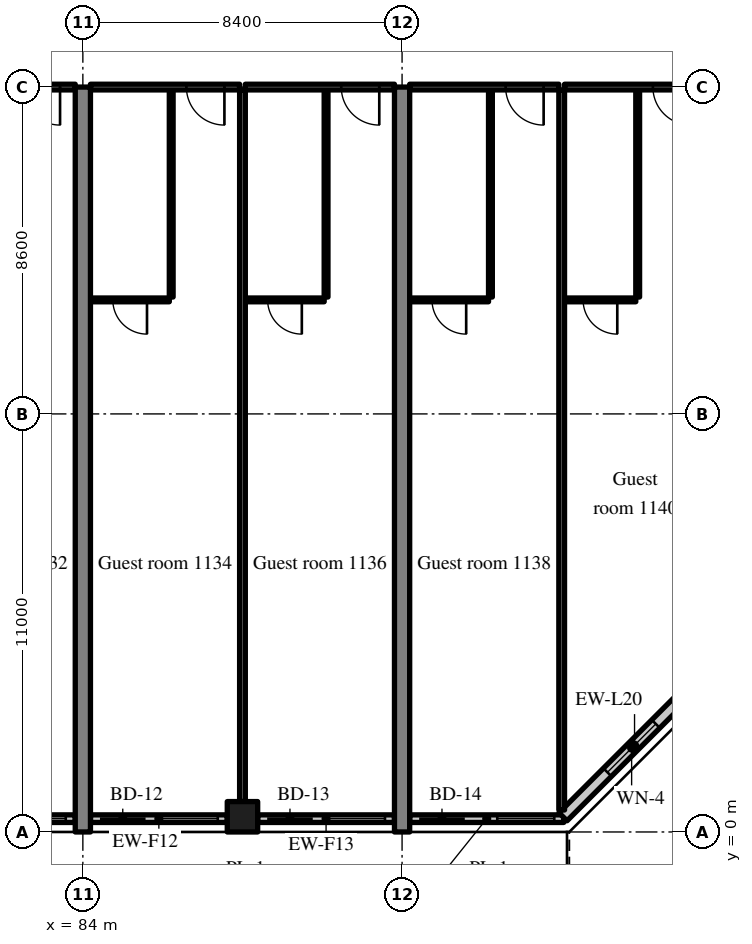
"""IFC4 building model, lengths in metres.
Left out: names, types, materials, properties, quantities, classifications, styles, units other than length and angle.
Written with IfcOpenShell. Run it as: python <this file> out.ifc"""

import sys

from ifc_helpers import new_model, si_unit, direction, frame, frame_2d, origin, origin_2d, place, context, subcontext, project, spatial, rectangle, extrude, source, transform, mapped, element, fill, save


model = new_model("IFC4")
c1 = context("Model", 3, precision=1e-05, world=origin(), true_north=direction((0.0, 1.0)))
c2 = subcontext(c1, "Body", "Model", "MODEL_VIEW")
j1 = project(units=[si_unit("LENGTHUNIT", "METRE"), si_unit("PLANEANGLEUNIT", "RADIAN")], contexts=[c1])
p1 = place(None, origin())
s1 = spatial("IfcSite", under=j1, at=p1, CompositionType="ELEMENT")
p2 = place(p1, origin())
s2 = spatial("IfcBuilding", under=s1, at=p2, CompositionType="ELEMENT")
p3 = place(p2, frame((0.0, 0.0, 50.6)))
s3 = spatial("IfcBuildingStorey", under=s2, at=p3, CompositionType="ELEMENT", Elevation=50.6)
m1 = source(origin(), c2, "Body", "SweptSolid", [
    extrude(rectangle(XDim=19.6, YDim=0.4, at=frame_2d((9.8, 0.0))), origin(), (0.0, 0.0, 1.0), 3.52),
])
for number, where, z_axis, x_axis in (
    (1, (84.0, 0.0, 0.0), (0.0, 0.0, 1.0), (0.0, 1.0, 0.0)),
    (2, (92.4, 0.0, 0.0), (0.0, 0.0, 1.0), (0.0, 1.0, 0.0)),
):
    element("IfcWall", number, at=place(p3, frame(where, z_axis=z_axis, x_axis=x_axis)), inside=s3, PredefinedType="SHEAR", context=c2, shape_type="MappedRepresentation", body=[
        mapped(m1, transform((0.0, 0.0, 0.0), scale=1.0)),
    ])
m2 = source(origin(), c2, "Body", "SweptSolid", [
    extrude(rectangle(XDim=0.8, YDim=0.8, at=origin_2d()), origin(), (0.0, 0.0, 1.0), 3.52),
])
p4 = place(p3, frame((88.2, 0.4, 0.0), z_axis=(0.0, 0.0, 1.0), x_axis=(1.0, 0.0, 0.0)))
e3 = element("IfcColumn", 3, at=p4, inside=s3, PredefinedType="COLUMN", context=c2, shape_type="MappedRepresentation", body=[
    mapped(m2, transform((0.0, 0.0, 0.0), scale=1.0)),
])
m3 = source(origin(), c2, "Body", "SweptSolid", [
    extrude(rectangle(XDim=3.6, YDim=0.2, at=frame_2d((1.8, 0.0))), origin(), (0.0, 0.0, 1.0), 2.82),
])
p5 = place(p3, frame((80.2, 0.35, 0.0), z_axis=(0.0, 0.0, 1.0), x_axis=(1.0, 0.0, 0.0)))
e4 = element("IfcWall", 4, at=p5, inside=s3, PredefinedType="SOLIDWALL", context=c2, shape_type="MappedRepresentation", body=[
    mapped(m3, transform((0.0, 0.0, 0.0), scale=1.0)),
])
m4 = source(origin(), c2, "Body", "SweptSolid", [
    extrude(rectangle(XDim=1.2, YDim=2.4, at=frame_2d((0.6, 1.2))), frame((0.0, 0.11, 0.0), z_axis=(0.0, -1.0, 0.0), x_axis=(1.0, 0.0, 0.0)), (0.0, 0.0, 1.0), 0.22),
])
p6 = place(p5, frame((0.25, 0.0, 0.0)))
e5 = element("IfcOpeningElement", 5, at=p6, cuts=e4, PredefinedType="OPENING", context=c2, shape_type="MappedRepresentation", body=[
    mapped(m4, transform((0.0, 0.0, 0.0), scale=1.0)),
])
m5 = source(origin(), c2, "Body", "SweptSolid", [
    extrude(rectangle(XDim=1.5, YDim=1.5, at=frame_2d((0.75, 0.75))), frame((0.0, 0.11, 0.0), z_axis=(0.0, -1.0, 0.0), x_axis=(1.0, 0.0, 0.0)), (0.0, 0.0, 1.0), 0.22),
])
p7 = place(p5, frame((1.85, 0.0, 0.9)))
e6 = element("IfcOpeningElement", 6, at=p7, cuts=e4, PredefinedType="OPENING", context=c2, shape_type="MappedRepresentation", body=[
    mapped(m5, transform((0.0, 0.0, 0.0), scale=1.0)),
])
p8 = place(p3, frame((84.2, 0.35, 0.0), z_axis=(0.0, 0.0, 1.0), x_axis=(1.0, 0.0, 0.0)))
e7 = element("IfcWall", 7, at=p8, inside=s3, PredefinedType="SOLIDWALL", context=c2, shape_type="MappedRepresentation", body=[
    mapped(m3, transform((0.0, 0.0, 0.0), scale=1.0)),
])
p9 = place(p8, frame((0.25, 0.0, 0.0)))
e8 = element("IfcOpeningElement", 8, at=p9, cuts=e7, PredefinedType="OPENING", context=c2, shape_type="MappedRepresentation", body=[
    mapped(m4, transform((0.0, 0.0, 0.0), scale=1.0)),
])
p10 = place(p8, frame((1.85, 0.0, 0.9)))
e9 = element("IfcOpeningElement", 9, at=p10, cuts=e7, PredefinedType="OPENING", context=c2, shape_type="MappedRepresentation", body=[
    mapped(m5, transform((0.0, 0.0, 0.0), scale=1.0)),
])
m6 = source(origin(), c2, "Body", "SweptSolid", [
    extrude(rectangle(XDim=3.6, YDim=0.2, at=frame_2d((1.8, 0.0))), origin(), (0.0, 0.0, 1.0), 2.82),
])
p11 = place(p3, frame((88.6, 0.35, 0.0), z_axis=(0.0, 0.0, 1.0), x_axis=(1.0, 0.0, 0.0)))
e10 = element("IfcWall", 10, at=p11, inside=s3, PredefinedType="SOLIDWALL", context=c2, shape_type="MappedRepresentation", body=[
    mapped(m6, transform((0.0, 0.0, 0.0), scale=1.0)),
])
p12 = place(p11, frame((0.25, 0.0, 0.0)))
e11 = element("IfcOpeningElement", 11, at=p12, cuts=e10, PredefinedType="OPENING", context=c2, shape_type="MappedRepresentation", body=[
    mapped(m4, transform((0.0, 0.0, 0.0), scale=1.0)),
])
p13 = place(p11, frame((1.85, 0.0, 0.9)))
e12 = element("IfcOpeningElement", 12, at=p13, cuts=e10, PredefinedType="OPENING", context=c2, shape_type="MappedRepresentation", body=[
    mapped(m5, transform((0.0, 0.0, 0.0), scale=1.0)),
])
m7 = source(origin(), c2, "Body", "SweptSolid", [
    extrude(rectangle(XDim=4.055, YDim=0.2, at=frame_2d((2.027, 0.0))), origin(), (0.0, 0.0, 1.0), 2.82),
])
p14 = place(p3, frame((92.6, 0.35, 0.0), z_axis=(0.0, 0.0, 1.0), x_axis=(1.0, 0.0, 0.0)))
e13 = element("IfcWall", 13, at=p14, inside=s3, PredefinedType="SOLIDWALL", context=c2, shape_type="MappedRepresentation", body=[
    mapped(m7, transform((0.0, 0.0, 0.0), scale=1.0)),
])
p15 = place(p14, frame((0.25, 0.0, 0.0)))
e14 = element("IfcOpeningElement", 14, at=p15, cuts=e13, PredefinedType="OPENING", context=c2, shape_type="MappedRepresentation", body=[
    mapped(m4, transform((0.0, 0.0, 0.0), scale=1.0)),
])
p16 = place(p14, frame((2.305, 0.0, 0.9)))
e15 = element("IfcOpeningElement", 15, at=p16, cuts=e13, PredefinedType="OPENING", context=c2, shape_type="MappedRepresentation", body=[
    mapped(m5, transform((0.0, 0.0, 0.0), scale=1.0)),
])
m8 = source(origin(), c2, "Body", "SweptSolid", [
    extrude(rectangle(XDim=5.326, YDim=0.3, at=frame_2d((2.663, 0.0))), origin(), (0.0, 0.0, 1.0), 3.52),
])
p17 = place(p3, frame((96.634, 0.4, 0.0), z_axis=(0.0, 0.0, 1.0), x_axis=(0.707083859269, 0.707129702361, 0.0)))
e16 = element("IfcWall", 16, at=p17, inside=s3, PredefinedType="SOLIDWALL", context=c2, shape_type="MappedRepresentation", body=[
    mapped(m8, transform((0.0, 0.0, 0.0), scale=1.0)),
])
m9 = source(origin(), c2, "Body", "SweptSolid", [
    extrude(rectangle(XDim=1.8, YDim=1.5, at=frame_2d((0.9, 0.75))), frame((0.0, 0.16, 0.0), z_axis=(0.0, -1.0, 0.0), x_axis=(1.0, 0.0, 0.0)), (0.0, 0.0, 1.0), 0.32),
])
p18 = place(p17, frame((1.654, 0.0, 0.9)))
e17 = element("IfcOpeningElement", 17, at=p18, cuts=e16, PredefinedType="OPENING", context=c2, shape_type="MappedRepresentation", body=[
    mapped(m9, transform((0.0, 0.0, 0.0), scale=1.0)),
])
m10 = source(origin(), c2, "Body", "SweptSolid", [
    extrude(rectangle(XDim=3.925, YDim=0.15, at=frame_2d((1.962, 0.0))), origin(), (0.0, 0.0, 1.0), 2.82),
])
p19 = place(p3, frame((79.875, 19.6, 0.0), z_axis=(0.0, 0.0, 1.0), x_axis=(1.0, 0.0, 0.0)))
e18 = element("IfcWall", 18, at=p19, inside=s3, PredefinedType="PARTITIONING", context=c2, shape_type="MappedRepresentation", body=[
    mapped(m10, transform((0.0, 0.0, 0.0), scale=1.0)),
])
m11 = source(origin(), c2, "Body", "SweptSolid", [
    extrude(rectangle(XDim=1.0, YDim=2.1, at=frame_2d((0.5, 1.05))), frame((0.0, 0.085, 0.0), z_axis=(0.0, -1.0, 0.0), x_axis=(1.0, 0.0, 0.0)), (0.0, 0.0, 1.0), 0.17),
])
p20 = place(p19, frame((2.525, 0.0, 0.0)))
e19 = element("IfcOpeningElement", 19, at=p20, cuts=e18, PredefinedType="OPENING", context=c2, shape_type="MappedRepresentation", body=[
    mapped(m11, transform((0.0, 0.0, 0.0), scale=1.0)),
])
m12 = source(origin(), c2, "Body", "SweptSolid", [
    extrude(rectangle(XDim=5.45, YDim=0.1, at=frame_2d((2.725, 0.0))), origin(), (0.0, 0.0, 1.0), 3.52),
])
p21 = place(p3, frame((86.325, 14.075, 0.0), z_axis=(0.0, 0.0, 1.0), x_axis=(0.0, 1.0, 0.0)))
e20 = element("IfcWall", 20, at=p21, inside=s3, PredefinedType="PARTITIONING", context=c2, shape_type="MappedRepresentation", body=[
    mapped(m12, transform((0.0, 0.0, 0.0), scale=1.0)),
])
m13 = source(origin(), c2, "Body", "SweptSolid", [
    extrude(rectangle(XDim=2.075, YDim=0.1, at=frame_2d((1.038, 0.0))), origin(), (0.0, 0.0, 1.0), 3.52),
])
p22 = place(p3, frame((84.2, 14.0, 0.0), z_axis=(0.0, 0.0, 1.0), x_axis=(1.0, 0.0, 0.0)))
e21 = element("IfcWall", 21, at=p22, inside=s3, PredefinedType="PARTITIONING", context=c2, shape_type="MappedRepresentation", body=[
    mapped(m13, transform((0.0, 0.0, 0.0), scale=1.0)),
])
m14 = source(origin(), c2, "Body", "SweptSolid", [
    extrude(rectangle(XDim=0.9, YDim=2.1, at=frame_2d((0.45, 1.05))), frame((0.0, 0.06, 0.0), z_axis=(0.0, -1.0, 0.0), x_axis=(1.0, 0.0, 0.0)), (0.0, 0.0, 1.0), 0.12),
])
p23 = place(p22, frame((0.588, 0.0, 0.0)))
e22 = element("IfcOpeningElement", 22, at=p23, cuts=e21, PredefinedType="OPENING", context=c2, shape_type="MappedRepresentation", body=[
    mapped(m14, transform((0.0, 0.0, 0.0), scale=1.0)),
])
p24 = place(p3, frame((84.2, 19.6, 0.0), z_axis=(0.0, 0.0, 1.0), x_axis=(1.0, 0.0, 0.0)))
e23 = element("IfcWall", 23, at=p24, inside=s3, PredefinedType="PARTITIONING", context=c2, shape_type="MappedRepresentation", body=[
    mapped(m10, transform((0.0, 0.0, 0.0), scale=1.0)),
])
p25 = place(p24, frame((2.525, 0.0, 0.0)))
e24 = element("IfcOpeningElement", 24, at=p25, cuts=e23, PredefinedType="OPENING", context=c2, shape_type="MappedRepresentation", body=[
    mapped(m11, transform((0.0, 0.0, 0.0), scale=1.0)),
])
p26 = place(p3, frame((90.4, 14.075, 0.0), z_axis=(0.0, 0.0, 1.0), x_axis=(0.0, 1.0, 0.0)))
e25 = element("IfcWall", 25, at=p26, inside=s3, PredefinedType="PARTITIONING", context=c2, shape_type="MappedRepresentation", body=[
    mapped(m12, transform((0.0, 0.0, 0.0), scale=1.0)),
])
m15 = source(origin(), c2, "Body", "SweptSolid", [
    extrude(rectangle(XDim=2.075, YDim=0.1, at=frame_2d((1.038, 0.0))), origin(), (0.0, 0.0, 1.0), 3.52),
])
p27 = place(p3, frame((88.275, 14.0, 0.0), z_axis=(0.0, 0.0, 1.0), x_axis=(1.0, 0.0, 0.0)))
e26 = element("IfcWall", 26, at=p27, inside=s3, PredefinedType="PARTITIONING", context=c2, shape_type="MappedRepresentation", body=[
    mapped(m15, transform((0.0, 0.0, 0.0), scale=1.0)),
])
p28 = place(p27, frame((0.587, 0.0, 0.0)))
e27 = element("IfcOpeningElement", 27, at=p28, cuts=e26, PredefinedType="OPENING", context=c2, shape_type="MappedRepresentation", body=[
    mapped(m14, transform((0.0, 0.0, 0.0), scale=1.0)),
])
p29 = place(p3, frame((88.275, 19.6, 0.0), z_axis=(0.0, 0.0, 1.0), x_axis=(1.0, 0.0, 0.0)))
e28 = element("IfcWall", 28, at=p29, inside=s3, PredefinedType="PARTITIONING", context=c2, shape_type="MappedRepresentation", body=[
    mapped(m10, transform((0.0, 0.0, 0.0), scale=1.0)),
])
p30 = place(p29, frame((2.525, 0.0, 0.0)))
e29 = element("IfcOpeningElement", 29, at=p30, cuts=e28, PredefinedType="OPENING", context=c2, shape_type="MappedRepresentation", body=[
    mapped(m11, transform((0.0, 0.0, 0.0), scale=1.0)),
])
m16 = source(origin(), c2, "Body", "SweptSolid", [
    extrude(rectangle(XDim=18.725, YDim=0.15, at=frame_2d((9.362, 0.0))), origin(), (0.0, 0.0, 1.0), 3.52),
])
p31 = place(p3, frame((88.2, 0.8, 0.0), z_axis=(0.0, 0.0, 1.0), x_axis=(0.0, 1.0, 0.0)))
e30 = element("IfcWall", 30, at=p31, inside=s3, PredefinedType="PARTITIONING", context=c2, shape_type="MappedRepresentation", body=[
    mapped(m16, transform((0.0, 0.0, 0.0), scale=1.0)),
])
p32 = place(p3, frame((94.725, 14.075, 0.0), z_axis=(0.0, 0.0, 1.0), x_axis=(0.0, 1.0, 0.0)))
e31 = element("IfcWall", 31, at=p32, inside=s3, PredefinedType="PARTITIONING", context=c2, shape_type="MappedRepresentation", body=[
    mapped(m12, transform((0.0, 0.0, 0.0), scale=1.0)),
])
p33 = place(p3, frame((92.6, 14.0, 0.0), z_axis=(0.0, 0.0, 1.0), x_axis=(1.0, 0.0, 0.0)))
e32 = element("IfcWall", 32, at=p33, inside=s3, PredefinedType="PARTITIONING", context=c2, shape_type="MappedRepresentation", body=[
    mapped(m13, transform((0.0, 0.0, 0.0), scale=1.0)),
])
p34 = place(p33, frame((0.587, 0.0, 0.0)))
e33 = element("IfcOpeningElement", 33, at=p34, cuts=e32, PredefinedType="OPENING", context=c2, shape_type="MappedRepresentation", body=[
    mapped(m14, transform((0.0, 0.0, 0.0), scale=1.0)),
])
m17 = source(origin(), c2, "Body", "SweptSolid", [
    extrude(rectangle(XDim=3.925, YDim=0.15, at=frame_2d((1.962, 0.0))), origin(), (0.0, 0.0, 1.0), 2.82),
])
p35 = place(p3, frame((92.6, 19.6, 0.0), z_axis=(0.0, 0.0, 1.0), x_axis=(1.0, 0.0, 0.0)))
e34 = element("IfcWall", 34, at=p35, inside=s3, PredefinedType="PARTITIONING", context=c2, shape_type="MappedRepresentation", body=[
    mapped(m17, transform((0.0, 0.0, 0.0), scale=1.0)),
])
p36 = place(p35, frame((2.525, 0.0, 0.0)))
e35 = element("IfcOpeningElement", 35, at=p36, cuts=e34, PredefinedType="OPENING", context=c2, shape_type="MappedRepresentation", body=[
    mapped(m11, transform((0.0, 0.0, 0.0), scale=1.0)),
])
p37 = place(p3, frame((98.6, 14.075, 0.0), z_axis=(0.0, 0.0, 1.0), x_axis=(0.0, 1.0, 0.0)))
e36 = element("IfcWall", 36, at=p37, inside=s3, PredefinedType="PARTITIONING", context=c2, shape_type="MappedRepresentation", body=[
    mapped(m12, transform((0.0, 0.0, 0.0), scale=1.0)),
])
m18 = source(origin(), c2, "Body", "SweptSolid", [
    extrude(rectangle(XDim=1.875, YDim=0.1, at=frame_2d((0.938, 0.0))), origin(), (0.0, 0.0, 1.0), 3.52),
])
p38 = place(p3, frame((96.675, 14.0, 0.0), z_axis=(0.0, 0.0, 1.0), x_axis=(1.0, 0.0, 0.0)))
e37 = element("IfcWall", 37, at=p38, inside=s3, PredefinedType="PARTITIONING", context=c2, shape_type="MappedRepresentation", body=[
    mapped(m18, transform((0.0, 0.0, 0.0), scale=1.0)),
])
p39 = place(p38, frame((0.488, 0.0, 0.0)))
e38 = element("IfcOpeningElement", 38, at=p39, cuts=e37, PredefinedType="OPENING", context=c2, shape_type="MappedRepresentation", body=[
    mapped(m14, transform((0.0, 0.0, 0.0), scale=1.0)),
])
m19 = source(origin(), c2, "Body", "SweptSolid", [
    extrude(rectangle(XDim=3.725, YDim=0.15, at=frame_2d((1.862, 0.0))), origin(), (0.0, 0.0, 1.0), 2.82),
])
p40 = place(p3, frame((96.675, 19.6, 0.0), z_axis=(0.0, 0.0, 1.0), x_axis=(1.0, 0.0, 0.0)))
e39 = element("IfcWall", 39, at=p40, inside=s3, PredefinedType="PARTITIONING", context=c2, shape_type="MappedRepresentation", body=[
    mapped(m19, transform((0.0, 0.0, 0.0), scale=1.0)),
])
p41 = place(p40, frame((2.325, 0.0, 0.0)))
e40 = element("IfcOpeningElement", 40, at=p41, cuts=e39, PredefinedType="OPENING", context=c2, shape_type="MappedRepresentation", body=[
    mapped(m11, transform((0.0, 0.0, 0.0), scale=1.0)),
])
m20 = source(origin(), c2, "Body", "SweptSolid", [
    extrude(rectangle(XDim=18.947, YDim=0.15, at=frame_2d((9.474, 0.0))), origin(), (0.0, 0.0, 1.0), 3.52),
])
p42 = place(p3, frame((96.6, 0.578, 0.0), z_axis=(0.0, 0.0, 1.0), x_axis=(0.0, 1.0, 0.0)))
e41 = element("IfcWall", 41, at=p42, inside=s3, PredefinedType="PARTITIONING", context=c2, shape_type="MappedRepresentation", body=[
    mapped(m20, transform((0.0, 0.0, 0.0), scale=1.0)),
])
m21 = source(origin(), c2, "Body", "SweptSolid", [
    extrude(rectangle(XDim=1.5, YDim=1.5, at=frame_2d((0.75, 0.75))), frame((0.0, 0.03, 0.0), z_axis=(0.0, -1.0, 0.0), x_axis=(1.0, 0.0, 0.0)), (0.0, 0.0, 1.0), 0.06),
])
p43 = place(p7, origin())
e42 = element("IfcWindow", 42, at=p43, inside=s3, PartitioningType="SINGLE_PANEL", PredefinedType="WINDOW", context=c2, shape_type="MappedRepresentation", body=[
    mapped(m21, transform((0.0, 0.0, 0.0), scale=1.0)),
])
fill(e6, e42)
m22 = source(origin(), c2, "Body", "SweptSolid", [
    extrude(rectangle(XDim=1.2, YDim=2.4, at=frame_2d((0.6, 1.2))), frame((0.0, 0.025, 0.0), z_axis=(0.0, -1.0, 0.0), x_axis=(1.0, 0.0, 0.0)), (0.0, 0.0, 1.0), 0.05),
])
p44 = place(p9, origin())
e43 = element("IfcDoor", 43, at=p44, inside=s3, OperationType="SLIDING_TO_RIGHT", PredefinedType="DOOR", context=c2, shape_type="MappedRepresentation", body=[
    mapped(m22, transform((0.0, 0.0, 0.0), scale=1.0)),
])
fill(e8, e43)
p45 = place(p10, origin())
e44 = element("IfcWindow", 44, at=p45, inside=s3, PartitioningType="SINGLE_PANEL", PredefinedType="WINDOW", context=c2, shape_type="MappedRepresentation", body=[
    mapped(m21, transform((0.0, 0.0, 0.0), scale=1.0)),
])
fill(e9, e44)
p46 = place(p12, origin())
e45 = element("IfcDoor", 45, at=p46, inside=s3, OperationType="SLIDING_TO_LEFT", PredefinedType="DOOR", context=c2, shape_type="MappedRepresentation", body=[
    mapped(m22, transform((0.0, 0.0, 0.0), scale=1.0)),
])
fill(e11, e45)
p47 = place(p13, origin())
e46 = element("IfcWindow", 46, at=p47, inside=s3, PartitioningType="SINGLE_PANEL", PredefinedType="WINDOW", context=c2, shape_type="MappedRepresentation", body=[
    mapped(m21, transform((0.0, 0.0, 0.0), scale=1.0)),
])
fill(e12, e46)
p48 = place(p15, origin())
e47 = element("IfcDoor", 47, at=p48, inside=s3, OperationType="SLIDING_TO_RIGHT", PredefinedType="DOOR", context=c2, shape_type="MappedRepresentation", body=[
    mapped(m22, transform((0.0, 0.0, 0.0), scale=1.0)),
])
fill(e14, e47)
p49 = place(p16, origin())
e48 = element("IfcWindow", 48, at=p49, inside=s3, PartitioningType="SINGLE_PANEL", PredefinedType="WINDOW", context=c2, shape_type="MappedRepresentation", body=[
    mapped(m21, transform((0.0, 0.0, 0.0), scale=1.0)),
])
fill(e15, e48)
m23 = source(origin(), c2, "Body", "SweptSolid", [
    extrude(rectangle(XDim=1.8, YDim=1.5, at=frame_2d((0.9, 0.75))), frame((0.0, 0.03, 0.0), z_axis=(0.0, -1.0, 0.0), x_axis=(1.0, 0.0, 0.0)), (0.0, 0.0, 1.0), 0.06),
])
p50 = place(p18, origin())
e49 = element("IfcWindow", 49, at=p50, inside=s3, PartitioningType="SINGLE_PANEL", PredefinedType="WINDOW", context=c2, shape_type="MappedRepresentation", body=[
    mapped(m23, transform((0.0, 0.0, 0.0), scale=1.0)),
])
fill(e17, e49)
m24 = source(origin(), c2, "Body", "SweptSolid", [
    extrude(rectangle(XDim=1.0, YDim=2.1, at=frame_2d((0.5, 1.05))), frame((0.0, 0.025, 0.0), z_axis=(0.0, -1.0, 0.0), x_axis=(1.0, 0.0, 0.0)), (0.0, 0.0, 1.0), 0.05),
])
p51 = place(p20, origin())
e50 = element("IfcDoor", 50, at=p51, inside=s3, OperationType="SINGLE_SWING_RIGHT", PredefinedType="DOOR", context=c2, shape_type="MappedRepresentation", body=[
    mapped(m24, transform((0.0, 0.0, 0.0), scale=1.0)),
])
fill(e19, e50)
m25 = source(origin(), c2, "Body", "SweptSolid", [
    extrude(rectangle(XDim=0.9, YDim=2.1, at=frame_2d((0.45, 1.05))), frame((0.0, 0.025, 0.0), z_axis=(0.0, -1.0, 0.0), x_axis=(1.0, 0.0, 0.0)), (0.0, 0.0, 1.0), 0.05),
])
p52 = place(p23, origin())
e51 = element("IfcDoor", 51, at=p52, inside=s3, OperationType="SINGLE_SWING_RIGHT", PredefinedType="DOOR", context=c2, shape_type="MappedRepresentation", body=[
    mapped(m25, transform((0.0, 0.0, 0.0), scale=1.0)),
])
fill(e22, e51)
p53 = place(p25, origin())
e52 = element("IfcDoor", 52, at=p53, inside=s3, OperationType="SINGLE_SWING_RIGHT", PredefinedType="DOOR", context=c2, shape_type="MappedRepresentation", body=[
    mapped(m24, transform((0.0, 0.0, 0.0), scale=1.0)),
])
fill(e24, e52)
p54 = place(p28, origin())
e53 = element("IfcDoor", 53, at=p54, inside=s3, OperationType="SINGLE_SWING_RIGHT", PredefinedType="DOOR", context=c2, shape_type="MappedRepresentation", body=[
    mapped(m25, transform((0.0, 0.0, 0.0), scale=1.0)),
])
fill(e27, e53)
p55 = place(p30, origin())
e54 = element("IfcDoor", 54, at=p55, inside=s3, OperationType="SINGLE_SWING_RIGHT", PredefinedType="DOOR", context=c2, shape_type="MappedRepresentation", body=[
    mapped(m24, transform((0.0, 0.0, 0.0), scale=1.0)),
])
fill(e29, e54)
p56 = place(p34, origin())
e55 = element("IfcDoor", 55, at=p56, inside=s3, OperationType="SINGLE_SWING_RIGHT", PredefinedType="DOOR", context=c2, shape_type="MappedRepresentation", body=[
    mapped(m25, transform((0.0, 0.0, 0.0), scale=1.0)),
])
fill(e33, e55)
p57 = place(p36, origin())
e56 = element("IfcDoor", 56, at=p57, inside=s3, OperationType="SINGLE_SWING_RIGHT", PredefinedType="DOOR", context=c2, shape_type="MappedRepresentation", body=[
    mapped(m24, transform((0.0, 0.0, 0.0), scale=1.0)),
])
fill(e35, e56)
p58 = place(p39, origin())
e57 = element("IfcDoor", 57, at=p58, inside=s3, OperationType="SINGLE_SWING_RIGHT", PredefinedType="DOOR", context=c2, shape_type="MappedRepresentation", body=[
    mapped(m25, transform((0.0, 0.0, 0.0), scale=1.0)),
])
fill(e38, e57)
p59 = place(p41, origin())
e58 = element("IfcDoor", 58, at=p59, inside=s3, OperationType="SINGLE_SWING_RIGHT", PredefinedType="DOOR", context=c2, shape_type="MappedRepresentation", body=[
    mapped(m24, transform((0.0, 0.0, 0.0), scale=1.0)),
])
fill(e40, e58)
save(model, sys.argv[1])
